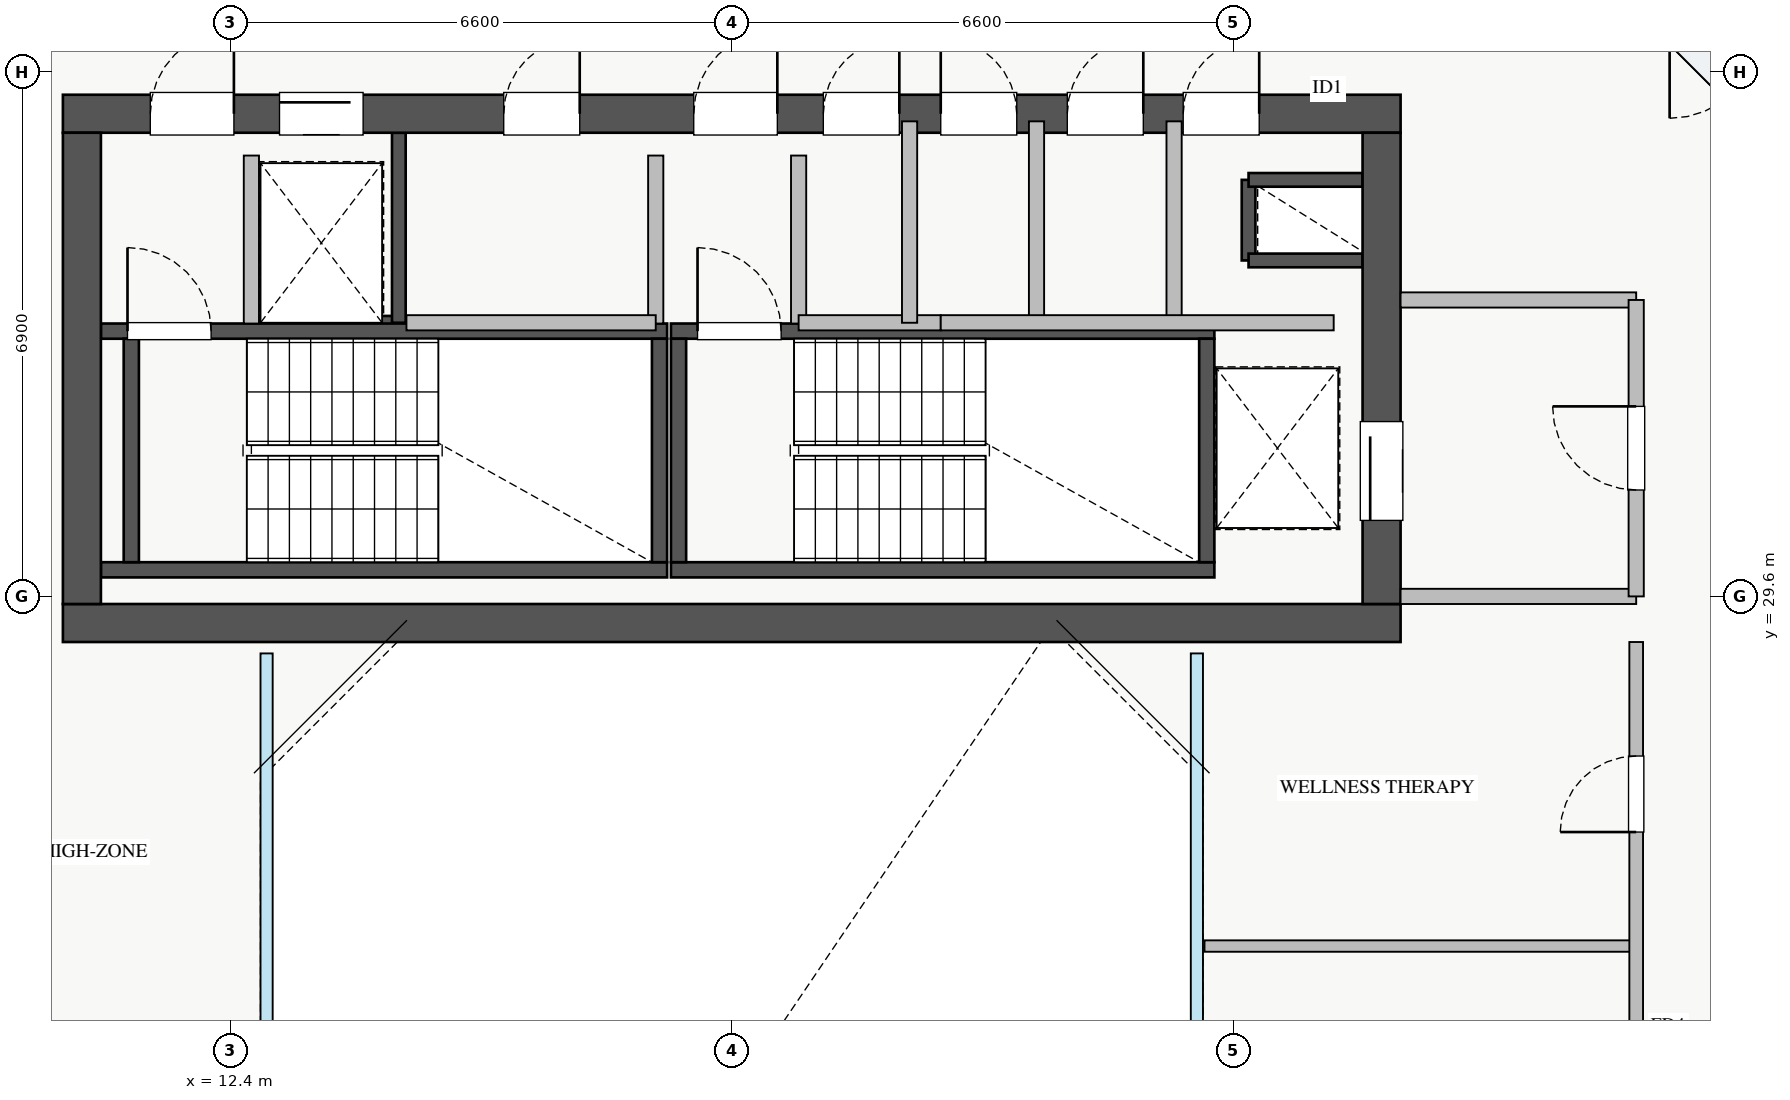
"""IFC4 building model, lengths in metres.
Left out: names, types, materials, properties, quantities, classifications, styles, units other than length and angle.
Written with IfcOpenShell. Run it as: python <this file> out.ifc"""

import sys

from ifc_helpers import new_model, si_unit, direction, frame, frame_2d, origin, place, context, subcontext, project, spatial, rectangle, extrude, source, transform, mapped, element, fill, save


model = new_model("IFC4")
c1 = context("Model", 3, precision=1e-05, world=origin(), true_north=direction((0.0, 1.0)))
c2 = subcontext(c1, "Body", "Model", "MODEL_VIEW")
j1 = project(units=[si_unit("LENGTHUNIT", "METRE"), si_unit("PLANEANGLEUNIT", "RADIAN")], contexts=[c1])
p1 = place(None, origin())
s1 = spatial("IfcSite", under=j1, at=p1, CompositionType="ELEMENT")
p2 = place(p1, origin())
s2 = spatial("IfcBuilding", under=s1, at=p2, CompositionType="ELEMENT")
p3 = place(p2, frame((0.0, 0.0, 223.0)))
s3 = spatial("IfcBuildingStorey", under=s2, at=p3, CompositionType="ELEMENT", Elevation=223.0)
p4 = place(p3, frame((12.68, 33.2, 0.0), z_axis=(0.0, 0.0, 1.0), x_axis=(1.0, 0.0, 0.0)))
e1 = element("IfcWall", 1, at=p4, inside=s3, PredefinedType="SHEAR", context=c2, shape_type="SweptSolid", body=[
    extrude(rectangle(XDim=1.94, YDim=0.18, at=frame_2d((0.97, 0.0))), origin(), (0.0, 0.0, 1.0), 3.07),
])
p5 = place(p3, frame((14.62, 33.2, 0.0), z_axis=(0.0, 0.0, 1.0), x_axis=(0.0, 1.0, 0.0)))
e2 = element("IfcWall", 2, at=p5, inside=s3, PredefinedType="SHEAR", context=c2, shape_type="SweptSolid", body=[
    extrude(rectangle(XDim=2.5, YDim=0.18, at=frame_2d((1.25, 0.0))), origin(), (0.0, 0.0, 1.0), 3.07),
])
p6 = place(p3, frame((25.8, 34.02, 0.0), z_axis=(0.0, 0.0, 1.0), x_axis=(0.0, 1.0, 0.0)))
e3 = element("IfcWall", 3, at=p6, inside=s3, PredefinedType="SHEAR", context=c2, shape_type="SweptSolid", body=[
    extrude(rectangle(XDim=1.06, YDim=0.18, at=frame_2d((0.53, 0.0))), origin(), (0.0, 0.0, 1.0), 3.07),
])
for number, where, z_axis, x_axis in (
    (4, (25.8, 35.08, 0.0), (0.0, 0.0, 1.0), (1.0, 0.0, 0.0)),
    (5, (25.8, 34.02, 0.0), (0.0, 0.0, 1.0), (1.0, 0.0, 0.0)),
):
    element("IfcWall", number, at=place(p3, frame(where, z_axis=z_axis, x_axis=x_axis)), inside=s3, PredefinedType="SHEAR", context=c2, shape_type="SweptSolid", body=[
        extrude(rectangle(XDim=1.5, YDim=0.18, at=frame_2d((0.75, 0.0))), origin(), (0.0, 0.0, 1.0), 3.07),
    ])
p7 = place(p3, frame((10.7, 29.95, 0.0), z_axis=(0.0, 0.0, 1.0), x_axis=(1.0, 0.0, 0.0)))
e6 = element("IfcWall", 6, at=p7, inside=s3, PredefinedType="SHEAR", context=c2, shape_type="SweptSolid", body=[
    extrude(rectangle(XDim=7.45, YDim=0.2, at=frame_2d((3.725, 0.0))), origin(), (0.0, 0.0, 1.0), 3.25),
])
p8 = place(p3, frame((10.7, 33.09, 0.0), z_axis=(0.0, 0.0, 1.0), x_axis=(1.0, 0.0, 0.0)))
e7 = element("IfcWall", 7, at=p8, inside=s3, PredefinedType="SHEAR", context=c2, shape_type="SweptSolid", body=[
    extrude(rectangle(XDim=7.45, YDim=0.2, at=frame_2d((3.725, 0.0))), origin(), (0.0, 0.0, 1.0), 3.25),
])
p9 = place(p8, frame((0.35, 0.0, 0.0)))
e8 = element("IfcOpeningElement", 8, at=p9, cuts=e7, PredefinedType="OPENING", context=c2, shape_type="SweptSolid", body=[
    extrude(rectangle(XDim=1.1, YDim=2.05, at=frame_2d((0.55, 1.025))), frame((0.0, 0.11, 0.0), z_axis=(0.0, -1.0, 0.0), x_axis=(1.0, 0.0, 0.0)), (0.0, 0.0, 1.0), 0.22),
])
for number, where, z_axis, x_axis in (
    (9, (11.1, 30.05, 0.0), (0.0, 0.0, 1.0), (0.0, 1.0, 0.0)),
    (10, (18.05, 30.05, 0.0), (0.0, 0.0, 1.0), (0.0, 1.0, 0.0)),
):
    element("IfcWall", number, at=place(p3, frame(where, z_axis=z_axis, x_axis=x_axis)), inside=s3, PredefinedType="SHEAR", context=c2, shape_type="SweptSolid", body=[
        extrude(rectangle(XDim=2.94, YDim=0.2, at=frame_2d((1.47, 0.0))), origin(), (0.0, 0.0, 1.0), 3.25),
    ])
p10 = place(p3, frame((18.2, 29.95, 0.0), z_axis=(0.0, 0.0, 1.0), x_axis=(1.0, 0.0, 0.0)))
e11 = element("IfcWall", 11, at=p10, inside=s3, PredefinedType="SHEAR", context=c2, shape_type="SweptSolid", body=[
    extrude(rectangle(XDim=7.15, YDim=0.2, at=frame_2d((3.575, 0.0))), origin(), (0.0, 0.0, 1.0), 3.25),
])
p11 = place(p3, frame((18.2, 33.09, 0.0), z_axis=(0.0, 0.0, 1.0), x_axis=(1.0, 0.0, 0.0)))
e12 = element("IfcWall", 12, at=p11, inside=s3, PredefinedType="SHEAR", context=c2, shape_type="SweptSolid", body=[
    extrude(rectangle(XDim=7.15, YDim=0.2, at=frame_2d((3.575, 0.0))), origin(), (0.0, 0.0, 1.0), 3.25),
])
p12 = place(p11, frame((0.35, 0.0, 0.0)))
e13 = element("IfcOpeningElement", 13, at=p12, cuts=e12, PredefinedType="OPENING", context=c2, shape_type="SweptSolid", body=[
    extrude(rectangle(XDim=1.1, YDim=2.05, at=frame_2d((0.55, 1.025))), frame((0.0, 0.11, 0.0), z_axis=(0.0, -1.0, 0.0), x_axis=(1.0, 0.0, 0.0)), (0.0, 0.0, 1.0), 0.22),
])
for number, where, z_axis, x_axis in (
    (14, (18.3, 30.05, 0.0), (0.0, 0.0, 1.0), (0.0, 1.0, 0.0)),
    (15, (25.25, 30.05, 0.0), (0.0, 0.0, 1.0), (0.0, 1.0, 0.0)),
):
    element("IfcWall", number, at=place(p3, frame(where, z_axis=z_axis, x_axis=x_axis)), inside=s3, PredefinedType="SHEAR", context=c2, shape_type="SweptSolid", body=[
        extrude(rectangle(XDim=2.94, YDim=0.2, at=frame_2d((1.47, 0.0))), origin(), (0.0, 0.0, 1.0), 3.25),
    ])
p13 = place(p3, frame((10.2, 29.25, 0.0), z_axis=(0.0, 0.0, 1.0), x_axis=(1.0, 0.0, 0.0)))
e16 = element("IfcWall", 16, at=p13, inside=s3, PredefinedType="SHEAR", context=c2, shape_type="SweptSolid", body=[
    extrude(rectangle(XDim=17.6, YDim=0.5, at=frame_2d((8.8, 0.0))), origin(), (0.0, 0.0, 1.0), 3.25),
])
p14 = place(p3, frame((10.2, 35.95, 0.0), z_axis=(0.0, 0.0, 1.0), x_axis=(1.0, 0.0, 0.0)))
e17 = element("IfcWall", 17, at=p14, inside=s3, PredefinedType="SHEAR", context=c2, shape_type="SweptSolid", body=[
    extrude(rectangle(XDim=17.6, YDim=0.5, at=frame_2d((8.8, 0.0))), origin(), (0.0, 0.0, 1.0), 3.25),
])
p15 = place(p14, frame((1.15, 0.0, 0.0)))
e18 = element("IfcOpeningElement", 18, at=p15, cuts=e17, PredefinedType="OPENING", context=c2, shape_type="SweptSolid", body=[
    extrude(rectangle(XDim=1.1, YDim=2.05, at=frame_2d((0.55, 1.025))), frame((0.0, 0.26, 0.0), z_axis=(0.0, -1.0, 0.0), x_axis=(1.0, 0.0, 0.0)), (0.0, 0.0, 1.0), 0.52),
])
p16 = place(p14, frame((8.3, 0.0, 0.0)))
e19 = element("IfcOpeningElement", 19, at=p16, cuts=e17, PredefinedType="OPENING", context=c2, shape_type="SweptSolid", body=[
    extrude(rectangle(XDim=1.1, YDim=2.05, at=frame_2d((0.55, 1.025))), frame((0.0, 0.26, 0.0), z_axis=(0.0, -1.0, 0.0), x_axis=(1.0, 0.0, 0.0)), (0.0, 0.0, 1.0), 0.52),
])
p17 = place(p14, frame((2.85, 0.0, 0.0)))
e20 = element("IfcOpeningElement", 20, at=p17, cuts=e17, PredefinedType="OPENING", context=c2, shape_type="SweptSolid", body=[
    extrude(rectangle(XDim=1.1, YDim=2.05, at=frame_2d((0.55, 1.025))), frame((0.0, 0.26, 0.0), z_axis=(0.0, -1.0, 0.0), x_axis=(1.0, 0.0, 0.0)), (0.0, 0.0, 1.0), 0.52),
])
p18 = place(p14, frame((5.8, 0.0, 0.0)))
e21 = element("IfcOpeningElement", 21, at=p18, cuts=e17, PredefinedType="OPENING", context=c2, shape_type="SweptSolid", body=[
    extrude(rectangle(XDim=1.0, YDim=2.05, at=frame_2d((0.5, 1.025))), frame((0.0, 0.26, 0.0), z_axis=(0.0, -1.0, 0.0), x_axis=(1.0, 0.0, 0.0)), (0.0, 0.0, 1.0), 0.52),
])
p19 = place(p14, frame((14.74, 0.0, 0.0)))
e22 = element("IfcOpeningElement", 22, at=p19, cuts=e17, PredefinedType="OPENING", context=c2, shape_type="SweptSolid", body=[
    extrude(rectangle(XDim=1.0, YDim=2.05, at=frame_2d((0.5, 1.025))), frame((0.0, 0.26, 0.0), z_axis=(0.0, -1.0, 0.0), x_axis=(1.0, 0.0, 0.0)), (0.0, 0.0, 1.0), 0.52),
])
p20 = place(p14, frame((10.005, 0.0, 0.0)))
e23 = element("IfcOpeningElement", 23, at=p20, cuts=e17, PredefinedType="OPENING", context=c2, shape_type="SweptSolid", body=[
    extrude(rectangle(XDim=1.0, YDim=2.05, at=frame_2d((0.5, 1.025))), frame((0.0, 0.26, 0.0), z_axis=(0.0, -1.0, 0.0), x_axis=(1.0, 0.0, 0.0)), (0.0, 0.0, 1.0), 0.52),
])
p21 = place(p14, frame((11.55, 0.0, 0.0)))
e24 = element("IfcOpeningElement", 24, at=p21, cuts=e17, PredefinedType="OPENING", context=c2, shape_type="SweptSolid", body=[
    extrude(rectangle(XDim=1.0, YDim=2.05, at=frame_2d((0.5, 1.025))), frame((0.0, 0.26, 0.0), z_axis=(0.0, -1.0, 0.0), x_axis=(1.0, 0.0, 0.0)), (0.0, 0.0, 1.0), 0.52),
])
p22 = place(p14, frame((13.215, 0.0, 0.0)))
e25 = element("IfcOpeningElement", 25, at=p22, cuts=e17, PredefinedType="OPENING", context=c2, shape_type="SweptSolid", body=[
    extrude(rectangle(XDim=1.0, YDim=2.05, at=frame_2d((0.5, 1.025))), frame((0.0, 0.26, 0.0), z_axis=(0.0, -1.0, 0.0), x_axis=(1.0, 0.0, 0.0)), (0.0, 0.0, 1.0), 0.52),
])
p23 = place(p3, frame((10.45, 29.5, 0.0), z_axis=(0.0, 0.0, 1.0), x_axis=(0.0, 1.0, 0.0)))
e26 = element("IfcWall", 26, at=p23, inside=s3, PredefinedType="SHEAR", context=c2, shape_type="SweptSolid", body=[
    extrude(rectangle(XDim=6.2, YDim=0.5, at=frame_2d((3.1, 0.0))), origin(), (0.0, 0.0, 1.0), 3.25),
])
p24 = place(p3, frame((27.55, 29.5, 0.0), z_axis=(0.0, 0.0, 1.0), x_axis=(0.0, 1.0, 0.0)))
e27 = element("IfcWall", 27, at=p24, inside=s3, PredefinedType="SHEAR", context=c2, shape_type="SweptSolid", body=[
    extrude(rectangle(XDim=6.2, YDim=0.5, at=frame_2d((3.1, 0.0))), origin(), (0.0, 0.0, 1.0), 3.25),
])
p25 = place(p24, frame((1.1, 0.0, 0.0)))
e28 = element("IfcOpeningElement", 28, at=p25, cuts=e27, PredefinedType="OPENING", context=c2, shape_type="SweptSolid", body=[
    extrude(rectangle(XDim=1.3, YDim=2.05, at=frame_2d((0.65, 1.025))), frame((0.0, 0.26, 0.0), z_axis=(0.0, -1.0, 0.0), x_axis=(1.0, 0.0, 0.0)), (0.0, 0.0, 1.0), 0.52),
])
p26 = place(p3, frame((27.8, 29.6, 0.0), z_axis=(0.0, 0.0, 1.0), x_axis=(1.0, 0.0, 0.0)))
e29 = element("IfcWall", 29, at=p26, inside=s3, PredefinedType="PARTITIONING", context=c2, shape_type="SweptSolid", body=[
    extrude(rectangle(XDim=3.1, YDim=0.2, at=frame_2d((1.55, 0.0))), origin(), (0.0, 0.0, 1.0), 3.07),
])
p27 = place(p3, frame((27.8, 33.5, 0.0), z_axis=(0.0, 0.0, 1.0), x_axis=(1.0, 0.0, 0.0)))
e30 = element("IfcWall", 30, at=p27, inside=s3, PredefinedType="PARTITIONING", context=c2, shape_type="SweptSolid", body=[
    extrude(rectangle(XDim=3.1, YDim=0.2, at=frame_2d((1.55, 0.0))), origin(), (0.0, 0.0, 1.0), 2.265),
])
p28 = place(p3, frame((30.9, 29.6, 0.0), z_axis=(0.0, 0.0, 1.0), x_axis=(0.0, 1.0, 0.0)))
e31 = element("IfcWall", 31, at=p28, inside=s3, PredefinedType="PARTITIONING", context=c2, shape_type="SweptSolid", body=[
    extrude(rectangle(XDim=3.9, YDim=0.2, at=frame_2d((1.95, 0.0))), origin(), (0.0, 0.0, 1.0), 3.07),
])
p29 = place(p28, frame((1.4, 0.0, 0.0)))
e32 = element("IfcOpeningElement", 32, at=p29, cuts=e31, PredefinedType="OPENING", context=c2, shape_type="SweptSolid", body=[
    extrude(rectangle(XDim=1.1, YDim=2.05, at=frame_2d((0.55, 1.025))), frame((0.0, 0.11, 0.0), z_axis=(0.0, -1.0, 0.0), x_axis=(1.0, 0.0, 0.0)), (0.0, 0.0, 1.0), 0.22),
])
for number, where, z_axis, x_axis in (
    (33, (12.68, 33.19, 0.0), (0.0, 0.0, 1.0), (0.0, 1.0, 0.0)),
    (34, (18.0, 33.19, 0.0), (0.0, 0.0, 1.0), (0.0, 1.0, 0.0)),
    (35, (19.88, 33.19, 0.0), (0.0, 0.0, 1.0), (0.0, 1.0, 0.0)),
):
    element("IfcWall", number, at=place(p3, frame(where, z_axis=z_axis, x_axis=x_axis)), inside=s3, PredefinedType="PARTITIONING", context=c2, shape_type="SweptSolid", body=[
        extrude(rectangle(XDim=2.21, YDim=0.2, at=frame_2d((1.105, 0.0))), origin(), (0.0, 0.0, 1.0), 3.07),
    ])
p30 = place(p3, frame((14.72, 33.2, 0.0), z_axis=(0.0, 0.0, 1.0), x_axis=(1.0, 0.0, 0.0)))
e36 = element("IfcWall", 36, at=p30, inside=s3, PredefinedType="PARTITIONING", context=c2, shape_type="SweptSolid", body=[
    extrude(rectangle(XDim=3.28, YDim=0.2, at=frame_2d((1.64, 0.0))), origin(), (0.0, 0.0, 1.0), 3.07),
])
p31 = place(p3, frame((24.82, 33.2, 0.0), z_axis=(0.0, 0.0, 1.0), x_axis=(0.0, 1.0, 0.0)))
e37 = element("IfcWall", 37, at=p31, inside=s3, PredefinedType="PARTITIONING", context=c2, shape_type="SweptSolid", body=[
    extrude(rectangle(XDim=2.65, YDim=0.2, at=frame_2d((1.325, 0.0))), origin(), (0.0, 0.0, 1.0), 3.07),
])
p32 = place(p3, frame((19.88, 33.2, 0.0), z_axis=(0.0, 0.0, 1.0), x_axis=(1.0, 0.0, 0.0)))
e38 = element("IfcWall", 38, at=p32, inside=s3, PredefinedType="PARTITIONING", context=c2, shape_type="SweptSolid", body=[
    extrude(rectangle(XDim=1.87, YDim=0.2, at=frame_2d((0.935, 0.0))), origin(), (0.0, 0.0, 1.0), 3.07),
])
for number, where, z_axis, x_axis in (
    (39, (21.34, 33.2, 0.0), (0.0, 0.0, 1.0), (0.0, 1.0, 0.0)),
    (40, (23.01, 33.2, 0.0), (0.0, 0.0, 1.0), (0.0, 1.0, 0.0)),
):
    element("IfcWall", number, at=place(p3, frame(where, z_axis=z_axis, x_axis=x_axis)), inside=s3, PredefinedType="PARTITIONING", context=c2, shape_type="SweptSolid", body=[
        extrude(rectangle(XDim=2.65, YDim=0.2, at=frame_2d((1.325, 0.0))), origin(), (0.0, 0.0, 1.0), 3.07),
    ])
p33 = place(p3, frame((21.75, 33.2, 0.0), z_axis=(0.0, 0.0, 1.0), x_axis=(1.0, 0.0, 0.0)))
e41 = element("IfcWall", 41, at=p33, inside=s3, PredefinedType="PARTITIONING", context=c2, shape_type="SweptSolid", body=[
    extrude(rectangle(XDim=5.17, YDim=0.2, at=frame_2d((2.585, 0.0))), origin(), (0.0, 0.0, 1.0), 3.07),
])
p34 = place(p3, frame((25.22, 25.0, 0.0), z_axis=(0.0, 0.0, 1.0), x_axis=(1.0, 0.0, 0.0)))
e42 = element("IfcWall", 42, at=p34, inside=s3, PredefinedType="PARTITIONING", context=c2, shape_type="SweptSolid", body=[
    extrude(rectangle(XDim=5.68, YDim=0.15, at=frame_2d((2.84, 0.0))), origin(), (0.0, 0.0, 1.0), 3.07),
])
p35 = place(p3, frame((30.9, 17.0, 0.0), z_axis=(0.0, 0.0, 1.0), x_axis=(0.0, 1.0, 0.0)))
e43 = element("IfcWall", 43, at=p35, inside=s3, PredefinedType="PARTITIONING", context=c2, shape_type="SweptSolid", body=[
    extrude(rectangle(XDim=12.0, YDim=0.18, at=frame_2d((6.0, 0.0))), origin(), (0.0, 0.0, 1.0), 3.07),
])
p36 = place(p35, frame((1.5, 0.0, 0.0)))
e44 = element("IfcOpeningElement", 44, at=p36, cuts=e43, PredefinedType="OPENING", context=c2, shape_type="SweptSolid", body=[
    extrude(rectangle(XDim=1.0, YDim=2.05, at=frame_2d((0.5, 1.025))), frame((0.0, 0.1, 0.0), z_axis=(0.0, -1.0, 0.0), x_axis=(1.0, 0.0, 0.0)), (0.0, 0.0, 1.0), 0.2),
])
p37 = place(p35, frame((5.5, 0.0, 0.0)))
e45 = element("IfcOpeningElement", 45, at=p37, cuts=e43, PredefinedType="OPENING", context=c2, shape_type="SweptSolid", body=[
    extrude(rectangle(XDim=1.0, YDim=2.05, at=frame_2d((0.5, 1.025))), frame((0.0, 0.1, 0.0), z_axis=(0.0, -1.0, 0.0), x_axis=(1.0, 0.0, 0.0)), (0.0, 0.0, 1.0), 0.2),
])
p38 = place(p35, frame((9.5, 0.0, 0.0)))
e46 = element("IfcOpeningElement", 46, at=p38, cuts=e43, PredefinedType="OPENING", context=c2, shape_type="SweptSolid", body=[
    extrude(rectangle(XDim=1.0, YDim=2.05, at=frame_2d((0.5, 1.025))), frame((0.0, 0.1, 0.0), z_axis=(0.0, -1.0, 0.0), x_axis=(1.0, 0.0, 0.0)), (0.0, 0.0, 1.0), 0.2),
])
m1 = source(origin(), c2, "Body", "SweptSolid", [
    extrude(rectangle(XDim=1.3, YDim=2.05, at=frame_2d((0.65, 1.025))), frame((0.0, 0.025, 0.0), z_axis=(0.0, -1.0, 0.0), x_axis=(1.0, 0.0, 0.0)), (0.0, 0.0, 1.0), 0.05),
])
p39 = place(p25, origin())
e47 = element("IfcDoor", 47, at=p39, inside=s3, OperationType="SLIDING_TO_LEFT", PredefinedType="DOOR", context=c2, shape_type="MappedRepresentation", body=[
    mapped(m1, transform((0.0, 0.0, 0.0), x_axis=(1.0, 0.0, 0.0), y_axis=(0.0, 1.0, 0.0), z_axis=(0.0, 0.0, 1.0), scale=1.0)),
])
fill(e28, e47)
m2 = source(origin(), c2, "Body", "SweptSolid", [
    extrude(rectangle(XDim=1.1, YDim=2.05, at=frame_2d((0.55, 1.025))), frame((0.0, 0.025, 0.0), z_axis=(0.0, -1.0, 0.0), x_axis=(1.0, 0.0, 0.0)), (0.0, 0.0, 1.0), 0.05),
])
p40 = place(p15, origin())
e48 = element("IfcDoor", 48, at=p40, inside=s3, OperationType="SINGLE_SWING_RIGHT", PredefinedType="DOOR", context=c2, shape_type="MappedRepresentation", body=[
    mapped(m2, transform((0.0, 0.0, 0.0), x_axis=(1.0, 0.0, 0.0), y_axis=(0.0, 1.0, 0.0), z_axis=(0.0, 0.0, 1.0), scale=1.0)),
])
fill(e18, e48)
p41 = place(p9, origin())
e49 = element("IfcDoor", 49, at=p41, inside=s3, OperationType="SINGLE_SWING_LEFT", PredefinedType="DOOR", context=c2, shape_type="MappedRepresentation", body=[
    mapped(m2, transform((0.0, 0.0, 0.0), x_axis=(1.0, 0.0, 0.0), y_axis=(0.0, 1.0, 0.0), z_axis=(0.0, 0.0, 1.0), scale=1.0)),
])
fill(e8, e49)
p42 = place(p16, origin())
e50 = element("IfcDoor", 50, at=p42, inside=s3, OperationType="SINGLE_SWING_RIGHT", PredefinedType="DOOR", context=c2, shape_type="MappedRepresentation", body=[
    mapped(m2, transform((0.0, 0.0, 0.0), x_axis=(1.0, 0.0, 0.0), y_axis=(0.0, 1.0, 0.0), z_axis=(0.0, 0.0, 1.0), scale=1.0)),
])
fill(e19, e50)
p43 = place(p12, origin())
e51 = element("IfcDoor", 51, at=p43, inside=s3, OperationType="SINGLE_SWING_LEFT", PredefinedType="DOOR", context=c2, shape_type="MappedRepresentation", body=[
    mapped(m2, transform((0.0, 0.0, 0.0), x_axis=(1.0, 0.0, 0.0), y_axis=(0.0, 1.0, 0.0), z_axis=(0.0, 0.0, 1.0), scale=1.0)),
])
fill(e13, e51)
p44 = place(p17, origin())
e52 = element("IfcDoor", 52, at=p44, inside=s3, OperationType="SLIDING_TO_LEFT", PredefinedType="DOOR", context=c2, shape_type="MappedRepresentation", body=[
    mapped(m2, transform((0.0, 0.0, 0.0), x_axis=(1.0, 0.0, 0.0), y_axis=(0.0, 1.0, 0.0), z_axis=(0.0, 0.0, 1.0), scale=1.0)),
])
fill(e20, e52)
m3 = source(origin(), c2, "Body", "SweptSolid", [
    extrude(rectangle(XDim=1.0, YDim=2.05, at=frame_2d((0.5, 1.025))), frame((0.0, 0.025, 0.0), z_axis=(0.0, -1.0, 0.0), x_axis=(1.0, 0.0, 0.0)), (0.0, 0.0, 1.0), 0.05),
])
p45 = place(p18, origin())
e53 = element("IfcDoor", 53, at=p45, inside=s3, OperationType="SINGLE_SWING_RIGHT", PredefinedType="DOOR", context=c2, shape_type="MappedRepresentation", body=[
    mapped(m3, transform((0.0, 0.0, 0.0), x_axis=(1.0, 0.0, 0.0), y_axis=(0.0, 1.0, 0.0), z_axis=(0.0, 0.0, 1.0), scale=1.0)),
])
fill(e21, e53)
p46 = place(p19, origin())
e54 = element("IfcDoor", 54, at=p46, inside=s3, OperationType="SINGLE_SWING_RIGHT", PredefinedType="DOOR", context=c2, shape_type="MappedRepresentation", body=[
    mapped(m3, transform((0.0, 0.0, 0.0), x_axis=(1.0, 0.0, 0.0), y_axis=(0.0, 1.0, 0.0), z_axis=(0.0, 0.0, 1.0), scale=1.0)),
])
fill(e22, e54)
p47 = place(p20, origin())
e55 = element("IfcDoor", 55, at=p47, inside=s3, OperationType="SINGLE_SWING_RIGHT", PredefinedType="DOOR", context=c2, shape_type="MappedRepresentation", body=[
    mapped(m3, transform((0.0, 0.0, 0.0), x_axis=(1.0, 0.0, 0.0), y_axis=(0.0, 1.0, 0.0), z_axis=(0.0, 0.0, 1.0), scale=1.0)),
])
fill(e23, e55)
p48 = place(p21, origin())
e56 = element("IfcDoor", 56, at=p48, inside=s3, OperationType="SINGLE_SWING_LEFT", PredefinedType="DOOR", context=c2, shape_type="MappedRepresentation", body=[
    mapped(m3, transform((0.0, 0.0, 0.0), x_axis=(1.0, 0.0, 0.0), y_axis=(0.0, 1.0, 0.0), z_axis=(0.0, 0.0, 1.0), scale=1.0)),
])
fill(e24, e56)
p49 = place(p22, origin())
e57 = element("IfcDoor", 57, at=p49, inside=s3, OperationType="SINGLE_SWING_RIGHT", PredefinedType="DOOR", context=c2, shape_type="MappedRepresentation", body=[
    mapped(m3, transform((0.0, 0.0, 0.0), x_axis=(1.0, 0.0, 0.0), y_axis=(0.0, 1.0, 0.0), z_axis=(0.0, 0.0, 1.0), scale=1.0)),
])
fill(e25, e57)
p50 = place(p29, origin())
e58 = element("IfcDoor", 58, at=p50, inside=s3, OperationType="SINGLE_SWING_RIGHT", PredefinedType="DOOR", context=c2, shape_type="MappedRepresentation", body=[
    mapped(m2, transform((0.0, 0.0, 0.0), x_axis=(1.0, 0.0, 0.0), y_axis=(0.0, 1.0, 0.0), z_axis=(0.0, 0.0, 1.0), scale=1.0)),
])
fill(e32, e58)
p51 = place(p38, origin())
e59 = element("IfcDoor", 59, at=p51, inside=s3, OperationType="SINGLE_SWING_LEFT", PredefinedType="DOOR", context=c2, shape_type="MappedRepresentation", body=[
    mapped(m3, transform((0.0, 0.0, 0.0), x_axis=(1.0, 0.0, 0.0), y_axis=(0.0, 1.0, 0.0), z_axis=(0.0, 0.0, 1.0), scale=1.0)),
])
fill(e46, e59)
save(model, sys.argv[1])
